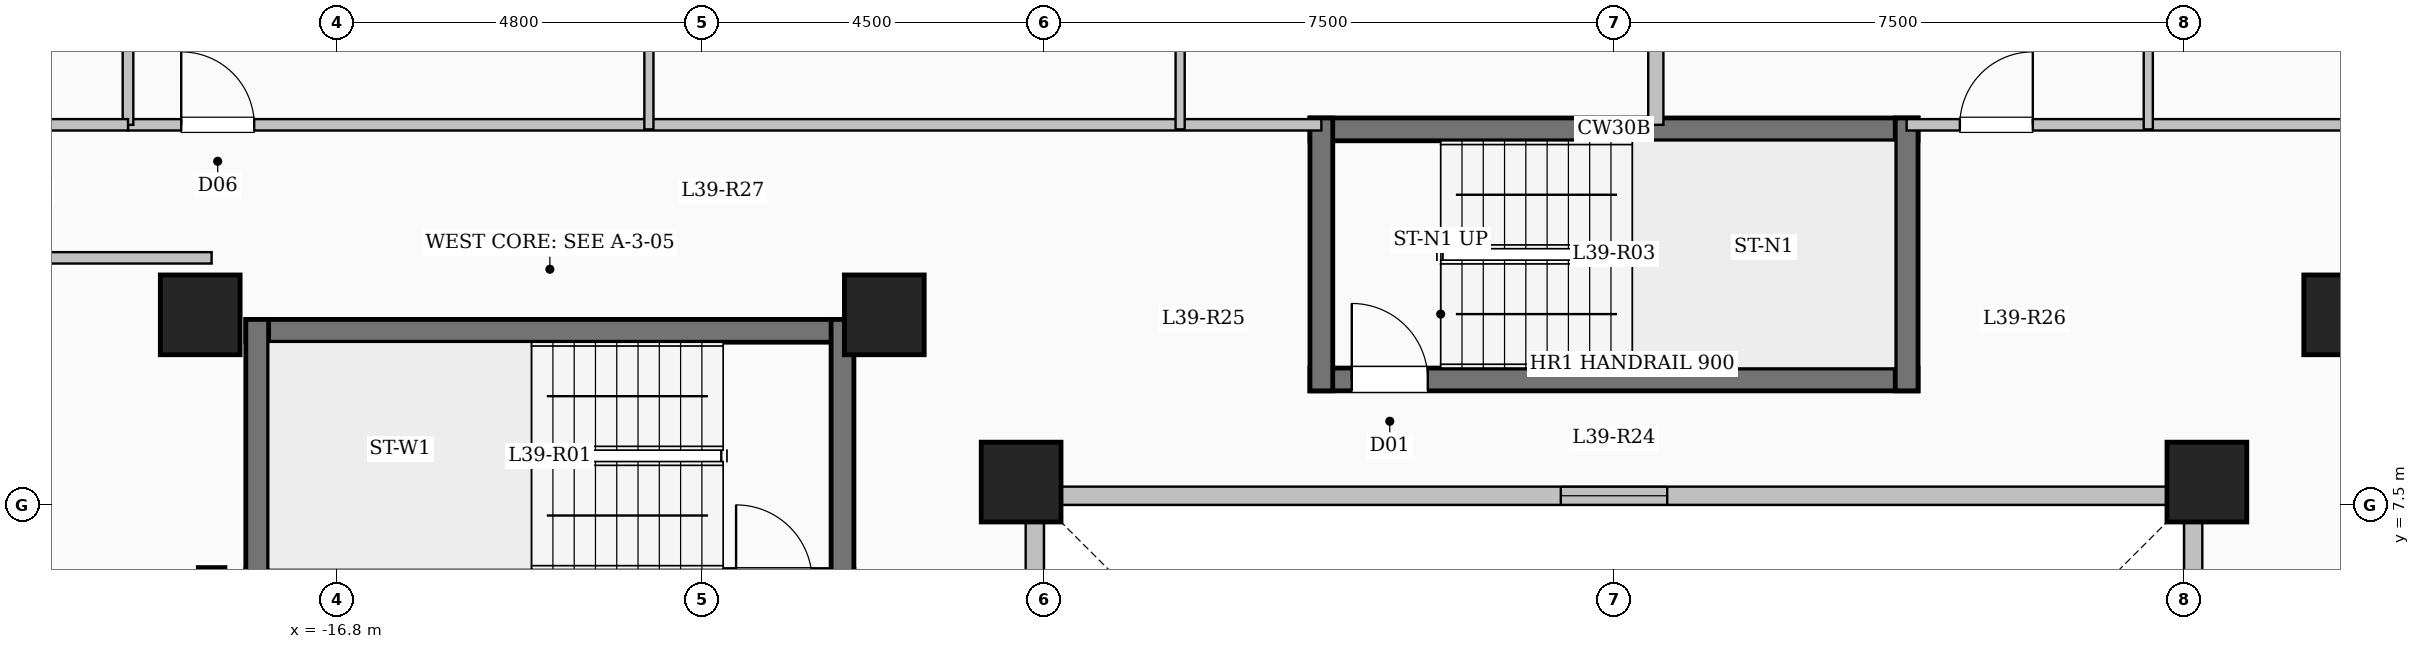
"""IFC4 building model, lengths in metres.
Left out: names, types, materials, properties, quantities, classifications, styles, units other than length and angle.
Written with IfcOpenShell. Run it as: python <this file> out.ifc"""

import sys

from ifc_helpers import new_model, si_unit, direction, frame, frame_2d, origin, origin_2d, place, context, subcontext, project, spatial, rectangle, extrude, element, fill, save


model = new_model("IFC4")
c1 = context("Model", 3, precision=1e-05, world=origin(), true_north=direction((0.0, 1.0)))
c2 = subcontext(c1, "Body", "Model", "MODEL_VIEW")
j1 = project(units=[si_unit("LENGTHUNIT", "METRE"), si_unit("PLANEANGLEUNIT", "RADIAN")], contexts=[c1])
p1 = place(None, origin())
s1 = spatial("IfcSite", under=j1, at=p1, CompositionType="ELEMENT")
p2 = place(p1, origin())
s2 = spatial("IfcBuilding", under=s1, at=p2, CompositionType="ELEMENT")
p3 = place(p2, frame((0.0, 0.0, 146.0)))
s3 = spatial("IfcBuildingStorey", under=s2, at=p3, CompositionType="ELEMENT", Elevation=146.0)
for number, where, z_axis, x_axis in (
    (1, (-7.8, 7.8, 0.0), (0.0, 0.0, 1.0), (1.0, 0.0, 0.0)),
    (2, (7.8, 7.8, 0.0), (0.0, 0.0, 1.0), (1.0, 0.0, 0.0)),
    (3, (-9.6, 10.0, 0.0), (0.0, 0.0, 1.0), (1.0, 0.0, 0.0)),
    (4, (9.6, 10.0, 0.0), (0.0, 0.0, 1.0), (1.0, 0.0, 0.0)),
    (5, (-18.6, 10.0, 0.0), (0.0, 0.0, 1.0), (1.0, 0.0, 0.0)),
):
    element("IfcColumn", number, at=place(p3, frame(where, z_axis=z_axis, x_axis=x_axis)), inside=s3, PredefinedType="COLUMN", context=c2, shape_type="SweptSolid", body=[
        extrude(rectangle(XDim=1.05, YDim=1.05, at=origin_2d()), origin(), (0.0, 0.0, 1.0), 3.35),
    ])
p4 = place(p3, frame((7.62, -7.62, 0.0), z_axis=(0.0, 0.0, 1.0), x_axis=(0.0, 1.0, 0.0)))
e6 = element("IfcWall", 6, at=p4, inside=s3, PredefinedType="SOLIDWALL", context=c2, shape_type="SweptSolid", body=[
    extrude(rectangle(XDim=15.24, YDim=0.24, at=frame_2d((7.62, 0.0))), origin(), (0.0, 0.0, 1.0), 3.1),
])
p5 = place(p4, frame((6.92, 0.0, 0.95)))
e7 = element("IfcOpeningElement", 7, at=p5, cuts=e6, PredefinedType="OPENING", context=c2, shape_type="SweptSolid", body=[
    extrude(rectangle(XDim=1.4, YDim=1.5, at=frame_2d((0.7, 0.75))), frame((0.0, 0.13, 0.0), z_axis=(0.0, -1.0, 0.0), x_axis=(1.0, 0.0, 0.0)), (0.0, 0.0, 1.0), 0.26),
])
p6 = place(p3, frame((7.62, 7.62, 0.0), z_axis=(0.0, 0.0, 1.0), x_axis=(-1.0, 0.0, 0.0)))
e8 = element("IfcWall", 8, at=p6, inside=s3, PredefinedType="SOLIDWALL", context=c2, shape_type="SweptSolid", body=[
    extrude(rectangle(XDim=15.24, YDim=0.24, at=frame_2d((7.62, 0.0))), origin(), (0.0, 0.0, 1.0), 3.1),
])
p7 = place(p6, frame((6.92, 0.0, 0.95)))
e9 = element("IfcOpeningElement", 9, at=p7, cuts=e8, PredefinedType="OPENING", context=c2, shape_type="SweptSolid", body=[
    extrude(rectangle(XDim=1.4, YDim=1.5, at=frame_2d((0.7, 0.75))), frame((0.0, 0.13, 0.0), z_axis=(0.0, -1.0, 0.0), x_axis=(1.0, 0.0, 0.0)), (0.0, 0.0, 1.0), 0.26),
])
p8 = place(p3, frame((-7.62, 7.62, 0.0), z_axis=(0.0, 0.0, 1.0), x_axis=(0.0, -1.0, 0.0)))
e10 = element("IfcWall", 10, at=p8, inside=s3, PredefinedType="SOLIDWALL", context=c2, shape_type="SweptSolid", body=[
    extrude(rectangle(XDim=15.24, YDim=0.24, at=frame_2d((7.62, 0.0))), origin(), (0.0, 0.0, 1.0), 3.1),
])
p9 = place(p8, frame((6.92, 0.0, 0.95)))
e11 = element("IfcOpeningElement", 11, at=p9, cuts=e10, PredefinedType="OPENING", context=c2, shape_type="SweptSolid", body=[
    extrude(rectangle(XDim=1.4, YDim=1.5, at=frame_2d((0.7, 0.75))), frame((0.0, 0.13, 0.0), z_axis=(0.0, -1.0, 0.0), x_axis=(1.0, 0.0, 0.0)), (0.0, 0.0, 1.0), 0.26),
])
p10 = place(p3, frame((-18.0, 9.79, 0.0), z_axis=(0.0, 0.0, 1.0), x_axis=(1.0, 0.0, 0.0)))
e12 = element("IfcWall", 12, at=p10, inside=s3, PredefinedType="SHEAR", context=c2, shape_type="SweptSolid", body=[
    extrude(rectangle(XDim=8.0, YDim=0.3, at=frame_2d((4.0, 0.0))), origin(), (0.0, 0.0, 1.0), 3.35),
])
p11 = place(p3, frame((-18.0, 6.5, 0.0), z_axis=(0.0, 0.0, 1.0), x_axis=(1.0, 0.0, 0.0)))
e13 = element("IfcWall", 13, at=p11, inside=s3, PredefinedType="SHEAR", context=c2, shape_type="SweptSolid", body=[
    extrude(rectangle(XDim=8.0, YDim=0.3, at=frame_2d((4.0, 0.0))), origin(), (0.0, 0.0, 1.0), 3.35),
])
p12 = place(p11, frame((6.45, 0.0, 0.0)))
e14 = element("IfcOpeningElement", 14, at=p12, cuts=e13, PredefinedType="OPENING", context=c2, shape_type="SweptSolid", body=[
    extrude(rectangle(XDim=1.0, YDim=2.15, at=frame_2d((0.5, 1.075))), frame((0.0, 0.16, 0.0), z_axis=(0.0, -1.0, 0.0), x_axis=(1.0, 0.0, 0.0)), (0.0, 0.0, 1.0), 0.32),
])
for number, where, z_axis, x_axis in (
    (15, (-17.85, 6.35, 0.0), (0.0, 0.0, 1.0), (0.0, 1.0, 0.0)),
    (16, (-10.15, 6.35, 0.0), (0.0, 0.0, 1.0), (0.0, 1.0, 0.0)),
):
    element("IfcWall", number, at=place(p3, frame(where, z_axis=z_axis, x_axis=x_axis)), inside=s3, PredefinedType="SHEAR", context=c2, shape_type="SweptSolid", body=[
        extrude(rectangle(XDim=3.59, YDim=0.3, at=frame_2d((1.795, 0.0))), origin(), (0.0, 0.0, 1.0), 3.35),
    ])
p13 = place(p3, frame((-4.0, 12.44, 0.0), z_axis=(0.0, 0.0, 1.0), x_axis=(1.0, 0.0, 0.0)))
e17 = element("IfcWall", 17, at=p13, inside=s3, PredefinedType="SHEAR", context=c2, shape_type="SweptSolid", body=[
    extrude(rectangle(XDim=8.0, YDim=0.3, at=frame_2d((4.0, 0.0))), origin(), (0.0, 0.0, 1.0), 3.35),
])
p14 = place(p3, frame((-4.0, 9.15, 0.0), z_axis=(0.0, 0.0, 1.0), x_axis=(1.0, 0.0, 0.0)))
e18 = element("IfcWall", 18, at=p14, inside=s3, PredefinedType="SHEAR", context=c2, shape_type="SweptSolid", body=[
    extrude(rectangle(XDim=8.0, YDim=0.3, at=frame_2d((4.0, 0.0))), origin(), (0.0, 0.0, 1.0), 3.35),
])
p15 = place(p14, frame((0.55, 0.0, 0.0)))
e19 = element("IfcOpeningElement", 19, at=p15, cuts=e18, PredefinedType="OPENING", context=c2, shape_type="SweptSolid", body=[
    extrude(rectangle(XDim=1.0, YDim=2.15, at=frame_2d((0.5, 1.075))), frame((0.0, 0.16, 0.0), z_axis=(0.0, -1.0, 0.0), x_axis=(1.0, 0.0, 0.0)), (0.0, 0.0, 1.0), 0.32),
])
for number, where, z_axis, x_axis in (
    (20, (-3.85, 9.0, 0.0), (0.0, 0.0, 1.0), (0.0, 1.0, 0.0)),
    (21, (3.85, 9.0, 0.0), (0.0, 0.0, 1.0), (0.0, 1.0, 0.0)),
):
    element("IfcWall", number, at=place(p3, frame(where, z_axis=z_axis, x_axis=x_axis)), inside=s3, PredefinedType="SHEAR", context=c2, shape_type="SweptSolid", body=[
        extrude(rectangle(XDim=3.59, YDim=0.3, at=frame_2d((1.795, 0.0))), origin(), (0.0, 0.0, 1.0), 3.35),
    ])
p16 = place(p3, frame((-18.45, -7.375, 0.0), z_axis=(0.0, 0.0, 1.0), x_axis=(0.0, 1.0, 0.0)))
e22 = element("IfcWall", 22, at=p16, inside=s3, PredefinedType="SHEAR", context=c2, shape_type="SweptSolid", body=[
    extrude(rectangle(XDim=14.05, YDim=0.35, at=frame_2d((7.025, 0.0))), origin(), (0.0, 0.0, 1.0), 3.35),
])
p17 = place(p3, frame((-19.55, 12.5, 0.0), z_axis=(0.0, 0.0, 1.0), x_axis=(1.0, 0.0, 0.0)))
e23 = element("IfcWall", 23, at=p17, inside=s3, PredefinedType="PARTITIONING", context=c2, shape_type="SweptSolid", body=[
    extrude(rectangle(XDim=15.7, YDim=0.15, at=frame_2d((7.85, 0.0))), origin(), (0.0, 0.0, 1.0), 3.1),
])
p18 = place(p17, frame((0.7, 0.0, 0.0)))
e24 = element("IfcOpeningElement", 24, at=p18, cuts=e23, PredefinedType="OPENING", context=c2, shape_type="SweptSolid", body=[
    extrude(rectangle(XDim=0.96, YDim=2.15, at=frame_2d((0.48, 1.075))), frame((0.0, 0.085, 0.0), z_axis=(0.0, -1.0, 0.0), x_axis=(1.0, 0.0, 0.0)), (0.0, 0.0, 1.0), 0.17),
])
p19 = place(p3, frame((3.85, 12.5, 0.0), z_axis=(0.0, 0.0, 1.0), x_axis=(1.0, 0.0, 0.0)))
e25 = element("IfcWall", 25, at=p19, inside=s3, PredefinedType="PARTITIONING", context=c2, shape_type="SweptSolid", body=[
    extrude(rectangle(XDim=15.7, YDim=0.15, at=frame_2d((7.85, 0.0))), origin(), (0.0, 0.0, 1.0), 3.1),
])
p20 = place(p19, frame((0.7, 0.0, 0.0)))
e26 = element("IfcOpeningElement", 26, at=p20, cuts=e25, PredefinedType="OPENING", context=c2, shape_type="SweptSolid", body=[
    extrude(rectangle(XDim=0.96, YDim=2.15, at=frame_2d((0.48, 1.075))), frame((0.0, 0.085, 0.0), z_axis=(0.0, -1.0, 0.0), x_axis=(1.0, 0.0, 0.0)), (0.0, 0.0, 1.0), 0.17),
])
p21 = place(p3, frame((0.55, 12.5, 0.0), z_axis=(0.0, 0.0, 1.0), x_axis=(0.0, 1.0, 0.0)))
e27 = element("IfcWall", 27, at=p21, inside=s3, PredefinedType="SOLIDWALL", context=c2, shape_type="SweptSolid", body=[
    extrude(rectangle(XDim=10.18, YDim=0.2, at=frame_2d((5.09, 0.0))), origin(), (0.0, 0.0, 1.0), 3.1),
])
p22 = place(p3, frame((-12.697, 12.44, 0.0), z_axis=(0.0, 0.0, 1.0), x_axis=(0.0, 1.0, 0.0)))
e28 = element("IfcWall", 28, at=p22, inside=s3, PredefinedType="PARTITIONING", context=c2, shape_type="SweptSolid", body=[
    extrude(rectangle(XDim=8.76, YDim=0.12, at=frame_2d((4.38, 0.0))), origin(), (0.0, 0.0, 1.0), 3.1),
])
p23 = place(p22, frame((2.905, 0.0, 0.0)))
e29 = element("IfcOpeningElement", 29, at=p23, cuts=e28, PredefinedType="OPENING", context=c2, shape_type="SweptSolid", body=[
    extrude(rectangle(XDim=1.08, YDim=2.15, at=frame_2d((0.54, 1.075))), frame((0.0, 0.07, 0.0), z_axis=(0.0, -1.0, 0.0), x_axis=(1.0, 0.0, 0.0)), (0.0, 0.0, 1.0), 0.14),
])
p24 = place(p3, frame((-5.708, 12.44, 0.0), z_axis=(0.0, 0.0, 1.0), x_axis=(0.0, 1.0, 0.0)))
e30 = element("IfcWall", 30, at=p24, inside=s3, PredefinedType="PARTITIONING", context=c2, shape_type="SweptSolid", body=[
    extrude(rectangle(XDim=2.62, YDim=0.12, at=frame_2d((1.31, 0.0))), origin(), (0.0, 0.0, 1.0), 3.1),
])
p25 = place(p3, frame((7.029, 12.44, 0.0), z_axis=(0.0, 0.0, 1.0), x_axis=(0.0, 1.0, 0.0)))
e31 = element("IfcWall", 31, at=p25, inside=s3, PredefinedType="PARTITIONING", context=c2, shape_type="SweptSolid", body=[
    extrude(rectangle(XDim=9.74, YDim=0.12, at=frame_2d((4.87, 0.0))), origin(), (0.0, 0.0, 1.0), 3.1),
])
p26 = place(p25, frame((3.075, 0.0, 0.0)))
e32 = element("IfcOpeningElement", 32, at=p26, cuts=e31, PredefinedType="OPENING", context=c2, shape_type="SweptSolid", body=[
    extrude(rectangle(XDim=1.08, YDim=2.15, at=frame_2d((0.54, 1.075))), frame((0.0, 0.07, 0.0), z_axis=(0.0, -1.0, 0.0), x_axis=(1.0, 0.0, 0.0)), (0.0, 0.0, 1.0), 0.14),
])
p27 = place(p3, frame((-25.08, 10.75, 0.0), z_axis=(0.0, 0.0, 1.0), x_axis=(1.0, 0.0, 0.0)))
e33 = element("IfcWall", 33, at=p27, inside=s3, PredefinedType="PARTITIONING", context=c2, shape_type="SweptSolid", body=[
    extrude(rectangle(XDim=6.63, YDim=0.15, at=frame_2d((3.315, 0.0))), origin(), (0.0, 0.0, 1.0), 3.1),
])
p28 = place(p3, frame((-19.55, 12.5, 0.0), z_axis=(0.0, 0.0, 1.0), x_axis=(0.0, 1.0, 0.0)))
e34 = element("IfcWall", 34, at=p28, inside=s3, PredefinedType="PARTITIONING", context=c2, shape_type="SweptSolid", body=[
    extrude(rectangle(XDim=4.75, YDim=0.14, at=frame_2d((2.375, 0.0))), origin(), (0.0, 0.0, 1.0), 3.1),
])
p29 = place(p3, frame((-25.08, 12.5, 0.0), z_axis=(0.0, 0.0, 1.0), x_axis=(1.0, 0.0, 0.0)))
e35 = element("IfcWall", 35, at=p29, inside=s3, PredefinedType="PARTITIONING", context=c2, shape_type="SweptSolid", body=[
    extrude(rectangle(XDim=5.53, YDim=0.15, at=frame_2d((2.765, 0.0))), origin(), (0.0, 0.0, 1.0), 3.1),
])
p30 = place(p29, frame((2.29, 0.0, 0.0)))
e36 = element("IfcOpeningElement", 36, at=p30, cuts=e35, PredefinedType="OPENING", context=c2, shape_type="SweptSolid", body=[
    extrude(rectangle(XDim=0.95, YDim=2.15, at=frame_2d((0.475, 1.075))), frame((0.0, 0.085, 0.0), z_axis=(0.0, -1.0, 0.0), x_axis=(1.0, 0.0, 0.0)), (0.0, 0.0, 1.0), 0.17),
])
p31 = place(p7, origin())
e37 = element("IfcWindow", 37, at=p31, inside=s3, PartitioningType="SINGLE_PANEL", PredefinedType="WINDOW", context=c2, shape_type="SweptSolid", body=[
    extrude(rectangle(XDim=1.4, YDim=1.5, at=frame_2d((0.7, 0.75))), frame((0.0, 0.03, 0.0), z_axis=(0.0, -1.0, 0.0), x_axis=(1.0, 0.0, 0.0)), (0.0, 0.0, 1.0), 0.06),
])
fill(e9, e37)
p32 = place(p15, origin())
e38 = element("IfcDoor", 38, at=p32, inside=s3, OperationType="SINGLE_SWING_LEFT", PredefinedType="DOOR", context=c2, shape_type="SweptSolid", body=[
    extrude(rectangle(XDim=1.0, YDim=2.15, at=frame_2d((0.5, 1.075))), frame((0.0, 0.025, 0.0), z_axis=(0.0, -1.0, 0.0), x_axis=(1.0, 0.0, 0.0)), (0.0, 0.0, 1.0), 0.05),
])
fill(e19, e38)
p33 = place(p18, origin())
e39 = element("IfcDoor", 39, at=p33, inside=s3, OperationType="SINGLE_SWING_LEFT", PredefinedType="DOOR", context=c2, shape_type="SweptSolid", body=[
    extrude(rectangle(XDim=0.96, YDim=2.15, at=frame_2d((0.48, 1.075))), frame((0.0, 0.025, 0.0), z_axis=(0.0, -1.0, 0.0), x_axis=(1.0, 0.0, 0.0)), (0.0, 0.0, 1.0), 0.05),
])
fill(e24, e39)
p34 = place(p20, origin())
e40 = element("IfcDoor", 40, at=p34, inside=s3, OperationType="SINGLE_SWING_RIGHT", PredefinedType="DOOR", context=c2, shape_type="SweptSolid", body=[
    extrude(rectangle(XDim=0.96, YDim=2.15, at=frame_2d((0.48, 1.075))), frame((0.0, 0.025, 0.0), z_axis=(0.0, -1.0, 0.0), x_axis=(1.0, 0.0, 0.0)), (0.0, 0.0, 1.0), 0.05),
])
fill(e26, e40)
save(model, sys.argv[1])
